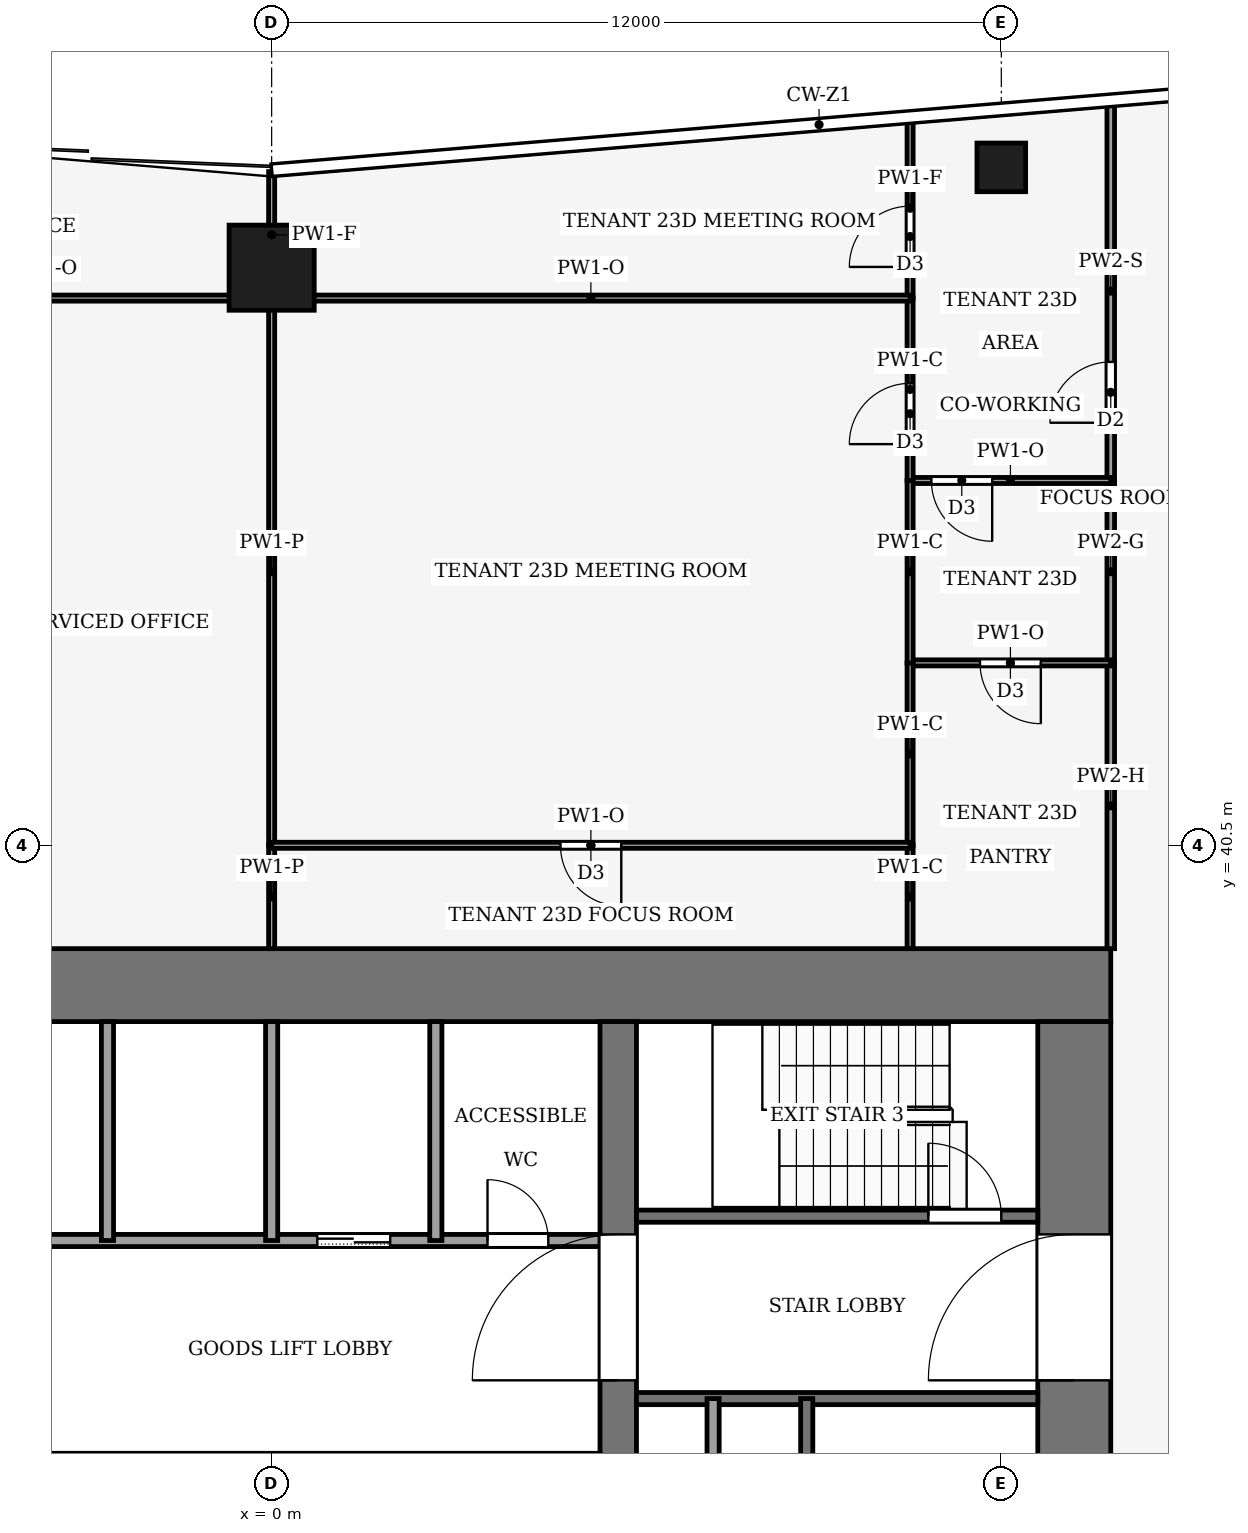
"""IFC4 building model, lengths in metres.
Left out: names, types, materials, properties, quantities, classifications, styles, units other than length and angle.
Written with IfcOpenShell. Run it as: python <this file> out.ifc"""

import sys

from ifc_helpers import new_model, si_unit, direction, frame, frame_2d, origin, origin_2d, place, context, subcontext, project, spatial, rectangle, hollow_rectangle, extrude, element, fill, save


model = new_model("IFC4")
c1 = context("Model", 3, precision=1e-05, world=origin(), true_north=direction((0.0, 1.0)))
c2 = subcontext(c1, "Body", "Model", "MODEL_VIEW")
j1 = project(units=[si_unit("LENGTHUNIT", "METRE"), si_unit("PLANEANGLEUNIT", "RADIAN")], contexts=[c1])
p1 = place(None, origin())
s1 = spatial("IfcSite", under=j1, at=p1, CompositionType="ELEMENT")
p2 = place(p1, origin())
s2 = spatial("IfcBuilding", under=s1, at=p2, CompositionType="ELEMENT")
p3 = place(p2, frame((0.0, 0.0, 102.0)))
s3 = spatial("IfcBuildingStorey", under=s2, at=p3, CompositionType="ELEMENT", Elevation=102.0)
p4 = place(p3, frame((-13.8, 38.2, -0.13), z_axis=(0.0, 0.0, 1.0), x_axis=(1.0, 0.0, 0.0)))
e1 = element("IfcWall", 1, at=p4, inside=s3, PredefinedType="SHEAR", context=c2, shape_type="SweptSolid", body=[
    extrude(rectangle(XDim=27.6, YDim=1.2, at=frame_2d((13.8, 0.0))), origin(), (0.0, 0.0, 1.0), 4.0),
])
p5 = place(p3, frame((13.2, 18.4, -0.13), z_axis=(0.0, 0.0, 1.0), x_axis=(0.0, 1.0, 0.0)))
e2 = element("IfcWall", 2, at=p5, inside=s3, PredefinedType="SHEAR", context=c2, shape_type="SweptSolid", body=[
    extrude(rectangle(XDim=19.2, YDim=1.2, at=frame_2d((9.6, 0.0))), origin(), (0.0, 0.0, 1.0), 4.0),
])
p6 = place(p5, frame((2.8, 0.0, 0.13)))
e3 = element("IfcOpeningElement", 3, at=p6, cuts=e2, PredefinedType="OPENING", context=c2, shape_type="SweptSolid", body=[
    extrude(rectangle(XDim=2.4, YDim=2.4, at=frame_2d((1.2, 1.2))), frame((0.0, 0.61, 0.0), z_axis=(0.0, -1.0, 0.0), x_axis=(1.0, 0.0, 0.0)), (0.0, 0.0, 1.0), 1.22),
])
p7 = place(p5, frame((13.3, 0.0, 0.13)))
e4 = element("IfcOpeningElement", 4, at=p7, cuts=e2, PredefinedType="OPENING", context=c2, shape_type="SweptSolid", body=[
    extrude(rectangle(XDim=2.4, YDim=2.4, at=frame_2d((1.2, 1.2))), frame((0.0, 0.61, 0.0), z_axis=(0.0, -1.0, 0.0), x_axis=(1.0, 0.0, 0.0)), (0.0, 0.0, 1.0), 1.22),
])
p8 = place(p3, frame((5.7, 18.4, -0.13), z_axis=(0.0, 0.0, 1.0), x_axis=(0.0, 1.0, 0.0)))
e5 = element("IfcWall", 5, at=p8, inside=s3, PredefinedType="SHEAR", context=c2, shape_type="SweptSolid", body=[
    extrude(rectangle(XDim=19.2, YDim=0.6, at=frame_2d((9.6, 0.0))), origin(), (0.0, 0.0, 1.0), 4.0),
])
p9 = place(p8, frame((13.3, 0.0, 0.13)))
e6 = element("IfcOpeningElement", 6, at=p9, cuts=e5, PredefinedType="OPENING", context=c2, shape_type="SweptSolid", body=[
    extrude(rectangle(XDim=2.4, YDim=2.4, at=frame_2d((1.2, 1.2))), frame((0.0, 0.31, 0.0), z_axis=(0.0, -1.0, 0.0), x_axis=(1.0, 0.0, 0.0)), (0.0, 0.0, 1.0), 0.62),
])
p10 = place(p3, frame((0.0, 50.0, 0.0), z_axis=(0.0, 0.0, 1.0), x_axis=(1.0, 0.0, 0.0)))
e7 = element("IfcColumn", 7, at=p10, inside=s3, PredefinedType="COLUMN", context=c2, shape_type="SweptSolid", body=[
    extrude(hollow_rectangle(XDim=1.4, YDim=1.4, WallThickness=0.08, at=origin_2d()), origin(), (0.0, 0.0, 1.0), 4.0),
])
p11 = place(p3, frame((12.0, 51.65, 0.0), z_axis=(0.0, 0.0, 1.0), x_axis=(1.0, 0.0, 0.0)))
e8 = element("IfcColumn", 8, at=p11, inside=s3, PredefinedType="COLUMN", context=c2, shape_type="SweptSolid", body=[
    extrude(hollow_rectangle(XDim=0.8, YDim=0.8, WallThickness=0.04, at=origin_2d()), origin(), (0.0, 0.0, 1.0), 4.0),
])
p12 = place(p3, frame((6.0, 31.4, 0.0), z_axis=(0.0, 0.0, 1.0), x_axis=(1.0, 0.0, 0.0)))
e9 = element("IfcWall", 9, at=p12, inside=s3, PredefinedType="PARTITIONING", context=c2, shape_type="SweptSolid", body=[
    extrude(rectangle(XDim=6.6, YDim=0.2, at=frame_2d((3.3, 0.0))), origin(), (0.0, 0.0, 1.0), 3.87),
])
p13 = place(p3, frame((-5.4, 34.0, 0.0), z_axis=(0.0, 0.0, 1.0), x_axis=(1.0, 0.0, 0.0)))
e10 = element("IfcWall", 10, at=p13, inside=s3, PredefinedType="PARTITIONING", context=c2, shape_type="SweptSolid", body=[
    extrude(rectangle(XDim=10.8, YDim=0.2, at=frame_2d((5.4, 0.0))), origin(), (0.0, 0.0, 1.0), 3.87),
])
p14 = place(p13, frame((6.15, 0.0, 0.0)))
e11 = element("IfcOpeningElement", 11, at=p14, cuts=e10, PredefinedType="OPENING", context=c2, shape_type="SweptSolid", body=[
    extrude(rectangle(XDim=1.2, YDim=2.2, at=frame_2d((0.6, 1.1))), frame((0.0, 0.11, 0.0), z_axis=(0.0, -1.0, 0.0), x_axis=(1.0, 0.0, 0.0)), (0.0, 0.0, 1.0), 0.22),
])
p15 = place(p13, frame((8.95, 0.0, 0.0)))
e12 = element("IfcOpeningElement", 12, at=p15, cuts=e10, PredefinedType="OPENING", context=c2, shape_type="SweptSolid", body=[
    extrude(rectangle(XDim=1.0, YDim=2.1, at=frame_2d((0.5, 1.05))), frame((0.0, 0.11, 0.0), z_axis=(0.0, -1.0, 0.0), x_axis=(1.0, 0.0, 0.0)), (0.0, 0.0, 1.0), 0.22),
])
p16 = place(p3, frame((6.0, 34.4, 0.0), z_axis=(0.0, 0.0, 1.0), x_axis=(1.0, 0.0, 0.0)))
e13 = element("IfcWall", 13, at=p16, inside=s3, PredefinedType="PARTITIONING", context=c2, shape_type="SweptSolid", body=[
    extrude(rectangle(XDim=6.6, YDim=0.2, at=frame_2d((3.3, 0.0))), origin(), (0.0, 0.0, 1.0), 3.87),
])
p17 = place(p16, frame((4.8, 0.0, 0.0)))
e14 = element("IfcOpeningElement", 14, at=p17, cuts=e13, PredefinedType="OPENING", context=c2, shape_type="SweptSolid", body=[
    extrude(rectangle(XDim=1.2, YDim=2.2, at=frame_2d((0.6, 1.1))), frame((0.0, 0.11, 0.0), z_axis=(0.0, -1.0, 0.0), x_axis=(1.0, 0.0, 0.0)), (0.0, 0.0, 1.0), 0.22),
])
for number, where, z_axis, x_axis in (
    (15, (-2.7, 34.0, 0.0), (0.0, 0.0, 1.0), (0.0, 1.0, 0.0)),
    (16, (0.0, 34.0, 0.0), (0.0, 0.0, 1.0), (0.0, 1.0, 0.0)),
    (17, (2.7, 34.0, 0.0), (0.0, 0.0, 1.0), (0.0, 1.0, 0.0)),
):
    element("IfcWall", number, at=place(p3, frame(where, z_axis=z_axis, x_axis=x_axis)), inside=s3, PredefinedType="PARTITIONING", context=c2, shape_type="SweptSolid", body=[
        extrude(rectangle(XDim=3.6, YDim=0.2, at=frame_2d((1.8, 0.0))), origin(), (0.0, 0.0, 1.0), 3.87),
    ])
for number, where, z_axis, x_axis in (
    (18, (7.26, 24.0, 0.0), (0.0, 0.0, 1.0), (0.0, 1.0, 0.0)),
    (19, (8.8, 24.0, 0.0), (0.0, 0.0, 1.0), (0.0, 1.0, 0.0)),
):
    element("IfcWall", number, at=place(p3, frame(where, z_axis=z_axis, x_axis=x_axis)), inside=s3, PredefinedType="PARTITIONING", context=c2, shape_type="SweptSolid", body=[
        extrude(rectangle(XDim=7.4, YDim=0.2, at=frame_2d((3.7, 0.0))), origin(), (0.0, 0.0, 1.0), 3.87),
    ])
p18 = place(p3, frame((13.8, 43.5, 0.0), z_axis=(0.0, 0.0, 1.0), x_axis=(0.0, -1.0, 0.0)))
e20 = element("IfcWall", 20, at=p18, inside=s3, PredefinedType="PARTITIONING", context=c2, shape_type="SweptSolid", body=[
    extrude(rectangle(XDim=4.7, YDim=0.125, at=frame_2d((2.35, 0.0))), origin(), (0.0, 0.0, 1.0), 3.14),
])
p19 = place(p3, frame((13.8, 46.5, 0.0), z_axis=(0.0, 0.0, 1.0), x_axis=(0.0, -1.0, 0.0)))
e21 = element("IfcWall", 21, at=p19, inside=s3, PredefinedType="PARTITIONING", context=c2, shape_type="SweptSolid", body=[
    extrude(rectangle(XDim=3.0, YDim=0.125, at=frame_2d((1.5, 0.0))), origin(), (0.0, 0.0, 1.0), 3.87),
])
p20 = place(p3, frame((13.8, 46.5, 0.0), z_axis=(0.0, 0.0, 1.0), x_axis=(0.0, 1.0, 0.0)))
e22 = element("IfcWall", 22, at=p20, inside=s3, PredefinedType="PARTITIONING", context=c2, shape_type="SweptSolid", body=[
    extrude(rectangle(XDim=6.23, YDim=0.125, at=frame_2d((3.115, 0.0))), origin(), (0.0, 0.0, 1.0), 3.04),
])
p21 = place(p20, frame((0.95, 0.0, 0.0)))
e23 = element("IfcOpeningElement", 23, at=p21, cuts=e22, PredefinedType="OPENING", context=c2, shape_type="SweptSolid", body=[
    extrude(rectangle(XDim=1.0, YDim=2.1, at=frame_2d((0.5, 1.05))), frame((0.0, 0.073, 0.0), z_axis=(0.0, -1.0, 0.0), x_axis=(1.0, 0.0, 0.0)), (0.0, 0.0, 1.0), 0.145),
])
p22 = place(p3, frame((-7.5, 49.5, 0.0), z_axis=(0.0, 0.0, 1.0), x_axis=(1.0, 0.0, 0.0)))
e24 = element("IfcWall", 24, at=p22, inside=s3, PredefinedType="PARTITIONING", context=c2, shape_type="SweptSolid", body=[
    extrude(rectangle(XDim=7.5, YDim=0.1, at=frame_2d((3.75, 0.0))), origin(), (0.0, 0.0, 1.0), 3.39),
])
p23 = place(p22, frame((2.85, 0.0, 0.0)))
e25 = element("IfcOpeningElement", 25, at=p23, cuts=e24, PredefinedType="OPENING", context=c2, shape_type="SweptSolid", body=[
    extrude(rectangle(XDim=1.0, YDim=2.1, at=frame_2d((0.5, 1.05))), frame((0.0, 0.06, 0.0), z_axis=(0.0, -1.0, 0.0), x_axis=(1.0, 0.0, 0.0)), (0.0, 0.0, 1.0), 0.12),
])
p24 = place(p3, frame((0.0, 38.8, 0.0), z_axis=(0.0, 0.0, 1.0), x_axis=(0.0, 1.0, 0.0)))
e26 = element("IfcWall", 26, at=p24, inside=s3, PredefinedType="PARTITIONING", context=c2, shape_type="SweptSolid", body=[
    extrude(rectangle(XDim=1.7, YDim=0.1, at=frame_2d((0.85, 0.0))), origin(), (0.0, 0.0, 1.0), 3.44),
])
p25 = place(p3, frame((0.0, 40.5, 0.0), z_axis=(0.0, 0.0, 1.0), x_axis=(0.0, 1.0, 0.0)))
e27 = element("IfcWall", 27, at=p25, inside=s3, PredefinedType="PARTITIONING", context=c2, shape_type="SweptSolid", body=[
    extrude(rectangle(XDim=9.0, YDim=0.1, at=frame_2d((4.5, 0.0))), origin(), (0.0, 0.0, 1.0), 3.44),
])
p26 = place(p3, frame((0.0, 49.5, 0.0), z_axis=(0.0, 0.0, 1.0), x_axis=(0.0, 1.0, 0.0)))
e28 = element("IfcWall", 28, at=p26, inside=s3, PredefinedType="PARTITIONING", context=c2, shape_type="SweptSolid", body=[
    extrude(rectangle(XDim=2.08, YDim=0.1, at=frame_2d((1.04, 0.0))), origin(), (0.0, 0.0, 1.0), 3.04),
])
p27 = place(p3, frame((13.8, 43.5, 0.0), z_axis=(0.0, 0.0, 1.0), x_axis=(-1.0, 0.0, 0.0)))
e29 = element("IfcWall", 29, at=p27, inside=s3, PredefinedType="PARTITIONING", context=c2, shape_type="SweptSolid", body=[
    extrude(rectangle(XDim=3.3, YDim=0.1, at=frame_2d((1.65, 0.0))), origin(), (0.0, 0.0, 1.0), 3.39),
])
p28 = place(p27, frame((1.15, 0.0, 0.0)))
e30 = element("IfcOpeningElement", 30, at=p28, cuts=e29, PredefinedType="OPENING", context=c2, shape_type="SweptSolid", body=[
    extrude(rectangle(XDim=1.0, YDim=2.1, at=frame_2d((0.5, 1.05))), frame((0.0, 0.06, 0.0), z_axis=(0.0, -1.0, 0.0), x_axis=(1.0, 0.0, 0.0)), (0.0, 0.0, 1.0), 0.12),
])
p29 = place(p3, frame((10.5, 40.5, 0.0), z_axis=(0.0, 0.0, 1.0), x_axis=(0.0, -1.0, 0.0)))
e31 = element("IfcWall", 31, at=p29, inside=s3, PredefinedType="PARTITIONING", context=c2, shape_type="SweptSolid", body=[
    extrude(rectangle(XDim=1.7, YDim=0.1, at=frame_2d((0.85, 0.0))), origin(), (0.0, 0.0, 1.0), 3.87),
])
p30 = place(p3, frame((10.5, 43.504, 0.0), z_axis=(0.0, 0.0, 1.0), x_axis=(0.0, -1.0, 0.0)))
e32 = element("IfcWall", 32, at=p30, inside=s3, PredefinedType="PARTITIONING", context=c2, shape_type="SweptSolid", body=[
    extrude(rectangle(XDim=3.004, YDim=0.1, at=frame_2d((1.502, 0.0))), origin(), (0.0, 0.0, 1.0), 3.87),
])
p31 = place(p3, frame((13.8, 46.5, 0.0), z_axis=(0.0, 0.0, 1.0), x_axis=(-1.0, 0.0, 0.0)))
e33 = element("IfcWall", 33, at=p31, inside=s3, PredefinedType="PARTITIONING", context=c2, shape_type="SweptSolid", body=[
    extrude(rectangle(XDim=3.3, YDim=0.1, at=frame_2d((1.65, 0.0))), origin(), (0.0, 0.0, 1.0), 3.39),
])
p32 = place(p31, frame((1.95, 0.0, 0.0)))
e34 = element("IfcOpeningElement", 34, at=p32, cuts=e33, PredefinedType="OPENING", context=c2, shape_type="SweptSolid", body=[
    extrude(rectangle(XDim=1.0, YDim=2.1, at=frame_2d((0.5, 1.05))), frame((0.0, 0.06, 0.0), z_axis=(0.0, -1.0, 0.0), x_axis=(1.0, 0.0, 0.0)), (0.0, 0.0, 1.0), 0.12),
])
p33 = place(p3, frame((10.5, 46.504, 0.0), z_axis=(0.0, 0.0, 1.0), x_axis=(0.0, -1.0, 0.0)))
e35 = element("IfcWall", 35, at=p33, inside=s3, PredefinedType="PARTITIONING", context=c2, shape_type="SweptSolid", body=[
    extrude(rectangle(XDim=3.008, YDim=0.1, at=frame_2d((1.504, 0.0))), origin(), (0.0, 0.0, 1.0), 3.87),
])
p34 = place(p3, frame((10.5, 46.496, 0.0), z_axis=(0.0, 0.0, 1.0), x_axis=(0.0, 1.0, 0.0)))
e36 = element("IfcWall", 36, at=p34, inside=s3, PredefinedType="PARTITIONING", context=c2, shape_type="SweptSolid", body=[
    extrude(rectangle(XDim=3.004, YDim=0.1, at=frame_2d((1.502, 0.0))), origin(), (0.0, 0.0, 1.0), 3.87),
])
p35 = place(p34, frame((0.602, 0.0, 0.0)))
e37 = element("IfcOpeningElement", 37, at=p35, cuts=e36, PredefinedType="OPENING", context=c2, shape_type="SweptSolid", body=[
    extrude(rectangle(XDim=1.0, YDim=2.1, at=frame_2d((0.5, 1.05))), frame((0.0, 0.06, 0.0), z_axis=(0.0, -1.0, 0.0), x_axis=(1.0, 0.0, 0.0)), (0.0, 0.0, 1.0), 0.12),
])
p36 = place(p3, frame((10.5, 49.5, 0.0), z_axis=(0.0, 0.0, 1.0), x_axis=(0.0, 1.0, 0.0)))
e38 = element("IfcWall", 38, at=p36, inside=s3, PredefinedType="PARTITIONING", context=c2, shape_type="SweptSolid", body=[
    extrude(rectangle(XDim=2.955, YDim=0.1, at=frame_2d((1.478, 0.0))), origin(), (0.0, 0.0, 1.0), 3.04),
])
p37 = place(p36, frame((0.512, 0.0, 0.0)))
e39 = element("IfcOpeningElement", 39, at=p37, cuts=e38, PredefinedType="OPENING", context=c2, shape_type="SweptSolid", body=[
    extrude(rectangle(XDim=1.0, YDim=2.1, at=frame_2d((0.5, 1.05))), frame((0.0, 0.06, 0.0), z_axis=(0.0, -1.0, 0.0), x_axis=(1.0, 0.0, 0.0)), (0.0, 0.0, 1.0), 0.12),
])
p38 = place(p3, frame((10.5, 40.5, 0.0), z_axis=(0.0, 0.0, 1.0), x_axis=(-1.0, 0.0, 0.0)))
e40 = element("IfcWall", 40, at=p38, inside=s3, PredefinedType="PARTITIONING", context=c2, shape_type="SweptSolid", body=[
    extrude(rectangle(XDim=10.5, YDim=0.1, at=frame_2d((5.25, 0.0))), origin(), (0.0, 0.0, 1.0), 3.39),
])
p39 = place(p38, frame((4.75, 0.0, 0.0)))
e41 = element("IfcOpeningElement", 41, at=p39, cuts=e40, PredefinedType="OPENING", context=c2, shape_type="SweptSolid", body=[
    extrude(rectangle(XDim=1.0, YDim=2.1, at=frame_2d((0.5, 1.05))), frame((0.0, 0.06, 0.0), z_axis=(0.0, -1.0, 0.0), x_axis=(1.0, 0.0, 0.0)), (0.0, 0.0, 1.0), 0.12),
])
p40 = place(p3, frame((10.5, 49.5, 0.0), z_axis=(0.0, 0.0, 1.0), x_axis=(-1.0, 0.0, 0.0)))
e42 = element("IfcWall", 42, at=p40, inside=s3, PredefinedType="PARTITIONING", context=c2, shape_type="SweptSolid", body=[
    extrude(rectangle(XDim=10.5, YDim=0.1, at=frame_2d((5.25, 0.0))), origin(), (0.0, 0.0, 1.0), 3.39),
])
p41 = place(p14, origin())
e43 = element("IfcDoor", 43, at=p41, inside=s3, OperationType="SLIDING_TO_LEFT", PredefinedType="DOOR", context=c2, shape_type="SweptSolid", body=[
    extrude(rectangle(XDim=1.2, YDim=2.2, at=frame_2d((0.6, 1.1))), frame((0.0, 0.025, 0.0), z_axis=(0.0, -1.0, 0.0), x_axis=(1.0, 0.0, 0.0)), (0.0, 0.0, 1.0), 0.05),
])
fill(e11, e43)
p42 = place(p15, origin())
e44 = element("IfcDoor", 44, at=p42, inside=s3, OperationType="SINGLE_SWING_LEFT", PredefinedType="DOOR", context=c2, shape_type="SweptSolid", body=[
    extrude(rectangle(XDim=1.0, YDim=2.1, at=frame_2d((0.5, 1.05))), frame((0.0, 0.025, 0.0), z_axis=(0.0, -1.0, 0.0), x_axis=(1.0, 0.0, 0.0)), (0.0, 0.0, 1.0), 0.05),
])
fill(e12, e44)
p43 = place(p17, origin())
e45 = element("IfcDoor", 45, at=p43, inside=s3, OperationType="SINGLE_SWING_RIGHT", PredefinedType="DOOR", context=c2, shape_type="SweptSolid", body=[
    extrude(rectangle(XDim=1.2, YDim=2.2, at=frame_2d((0.6, 1.1))), frame((0.0, 0.025, 0.0), z_axis=(0.0, -1.0, 0.0), x_axis=(1.0, 0.0, 0.0)), (0.0, 0.0, 1.0), 0.05),
])
fill(e14, e45)
p44 = place(p9, origin())
e46 = element("IfcDoor", 46, at=p44, inside=s3, OperationType="DOUBLE_DOOR_SINGLE_SWING", PredefinedType="DOOR", context=c2, shape_type="SweptSolid", body=[
    extrude(rectangle(XDim=2.4, YDim=2.4, at=frame_2d((1.2, 1.2))), frame((0.0, 0.025, 0.0), z_axis=(0.0, -1.0, 0.0), x_axis=(1.0, 0.0, 0.0)), (0.0, 0.0, 1.0), 0.05),
])
fill(e6, e46)
p45 = place(p7, origin())
e47 = element("IfcDoor", 47, at=p45, inside=s3, OperationType="DOUBLE_DOOR_SINGLE_SWING", PredefinedType="DOOR", context=c2, shape_type="SweptSolid", body=[
    extrude(rectangle(XDim=2.4, YDim=2.4, at=frame_2d((1.2, 1.2))), frame((0.0, 0.025, 0.0), z_axis=(0.0, -1.0, 0.0), x_axis=(1.0, 0.0, 0.0)), (0.0, 0.0, 1.0), 0.05),
])
fill(e4, e47)
p46 = place(p21, origin())
e48 = element("IfcDoor", 48, at=p46, inside=s3, OperationType="SINGLE_SWING_LEFT", PredefinedType="DOOR", context=c2, shape_type="SweptSolid", body=[
    extrude(rectangle(XDim=1.0, YDim=2.1, at=frame_2d((0.5, 1.05))), frame((0.0, 0.025, 0.0), z_axis=(0.0, -1.0, 0.0), x_axis=(1.0, 0.0, 0.0)), (0.0, 0.0, 1.0), 0.05),
])
fill(e23, e48)
p47 = place(p28, origin())
e49 = element("IfcDoor", 49, at=p47, inside=s3, OperationType="SINGLE_SWING_RIGHT", PredefinedType="DOOR", context=c2, shape_type="SweptSolid", body=[
    extrude(rectangle(XDim=1.0, YDim=2.1, at=frame_2d((0.5, 1.05))), frame((0.0, 0.025, 0.0), z_axis=(0.0, -1.0, 0.0), x_axis=(1.0, 0.0, 0.0)), (0.0, 0.0, 1.0), 0.05),
])
fill(e30, e49)
p48 = place(p32, origin())
e50 = element("IfcDoor", 50, at=p48, inside=s3, OperationType="SINGLE_SWING_RIGHT", PredefinedType="DOOR", context=c2, shape_type="SweptSolid", body=[
    extrude(rectangle(XDim=1.0, YDim=2.1, at=frame_2d((0.5, 1.05))), frame((0.0, 0.025, 0.0), z_axis=(0.0, -1.0, 0.0), x_axis=(1.0, 0.0, 0.0)), (0.0, 0.0, 1.0), 0.05),
])
fill(e34, e50)
p49 = place(p35, origin())
e51 = element("IfcDoor", 51, at=p49, inside=s3, OperationType="SINGLE_SWING_LEFT", PredefinedType="DOOR", context=c2, shape_type="SweptSolid", body=[
    extrude(rectangle(XDim=1.0, YDim=2.1, at=frame_2d((0.5, 1.05))), frame((0.0, 0.025, 0.0), z_axis=(0.0, -1.0, 0.0), x_axis=(1.0, 0.0, 0.0)), (0.0, 0.0, 1.0), 0.05),
])
fill(e37, e51)
p50 = place(p37, origin())
e52 = element("IfcDoor", 52, at=p50, inside=s3, OperationType="SINGLE_SWING_LEFT", PredefinedType="DOOR", context=c2, shape_type="SweptSolid", body=[
    extrude(rectangle(XDim=1.0, YDim=2.1, at=frame_2d((0.5, 1.05))), frame((0.0, 0.025, 0.0), z_axis=(0.0, -1.0, 0.0), x_axis=(1.0, 0.0, 0.0)), (0.0, 0.0, 1.0), 0.05),
])
fill(e39, e52)
p51 = place(p39, origin())
e53 = element("IfcDoor", 53, at=p51, inside=s3, OperationType="SINGLE_SWING_RIGHT", PredefinedType="DOOR", context=c2, shape_type="SweptSolid", body=[
    extrude(rectangle(XDim=1.0, YDim=2.1, at=frame_2d((0.5, 1.05))), frame((0.0, 0.025, 0.0), z_axis=(0.0, -1.0, 0.0), x_axis=(1.0, 0.0, 0.0)), (0.0, 0.0, 1.0), 0.05),
])
fill(e41, e53)
save(model, sys.argv[1])
